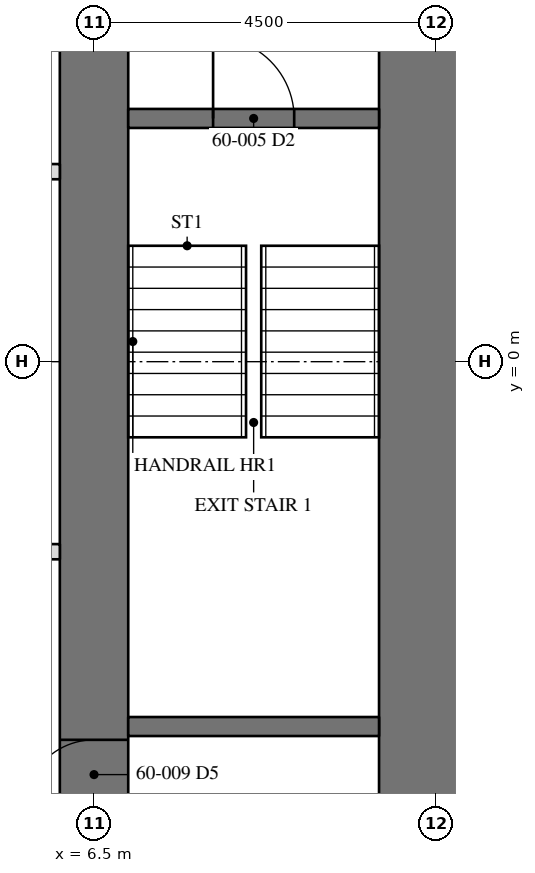
"""IFC4 building model, lengths in metres.
Left out: names, types, materials, properties, quantities, classifications, styles, units other than length and angle.
Written with IfcOpenShell. Run it as: python <this file> out.ifc"""

import sys

from ifc_helpers import new_model, si_unit, direction, frame, frame_2d, origin, place, context, subcontext, project, spatial, rectangle, extrude, element, fill, save


model = new_model("IFC4")
c1 = context("Model", 3, precision=1e-05, world=origin(), true_north=direction((0.0, 1.0)))
c2 = subcontext(c1, "Body", "Model", "MODEL_VIEW")
j1 = project(units=[si_unit("LENGTHUNIT", "METRE"), si_unit("PLANEANGLEUNIT", "RADIAN")], contexts=[c1])
p1 = place(None, origin())
s1 = spatial("IfcSite", under=j1, at=p1, CompositionType="ELEMENT")
p2 = place(p1, origin())
s2 = spatial("IfcBuilding", under=s1, at=p2, CompositionType="ELEMENT")
p3 = place(p2, frame((0.0, 0.0, 246.7)))
s3 = spatial("IfcBuildingStorey", under=s2, at=p3, CompositionType="ELEMENT", Elevation=246.7)
p4 = place(p3, frame((11.0, -11.0, 0.0), z_axis=(0.0, 0.0, 1.0), x_axis=(0.0, 1.0, 0.0)))
e1 = element("IfcWall", 1, at=p4, inside=s3, PredefinedType="SHEAR", context=c2, shape_type="SweptSolid", body=[
    extrude(rectangle(XDim=22.0, YDim=1.5, at=frame_2d((11.0, 0.0))), origin(), (0.0, 0.0, 1.0), 3.5),
])
p5 = place(p4, frame((15.393, 0.0, 0.0)))
e2 = element("IfcOpeningElement", 2, at=p5, cuts=e1, PredefinedType="OPENING", context=c2, shape_type="SweptSolid", body=[
    extrude(rectangle(XDim=0.915, YDim=2.134, at=frame_2d((0.458, 1.067))), frame((0.0, 0.76, 0.0), z_axis=(0.0, -1.0, 0.0), x_axis=(1.0, 0.0, 0.0)), (0.0, 0.0, 1.0), 1.52),
])
p6 = place(p3, frame((6.5, -6.5, 0.0), z_axis=(0.0, 0.0, 1.0), x_axis=(0.0, 1.0, 0.0)))
e3 = element("IfcWall", 3, at=p6, inside=s3, PredefinedType="SHEAR", context=c2, shape_type="SweptSolid", body=[
    extrude(rectangle(XDim=13.0, YDim=0.9, at=frame_2d((6.5, 0.0))), origin(), (0.0, 0.0, 1.0), 3.5),
])
p7 = place(p6, frame((10.893, 0.0, 0.0)))
e4 = element("IfcOpeningElement", 4, at=p7, cuts=e3, PredefinedType="OPENING", context=c2, shape_type="SweptSolid", body=[
    extrude(rectangle(XDim=0.915, YDim=2.134, at=frame_2d((0.458, 1.067))), frame((0.0, 0.46, 0.0), z_axis=(0.0, -1.0, 0.0), x_axis=(1.0, 0.0, 0.0)), (0.0, 0.0, 1.0), 0.92),
])
p8 = place(p6, frame((0.61, 0.0, 0.0)))
e5 = element("IfcOpeningElement", 5, at=p8, cuts=e3, PredefinedType="OPENING", context=c2, shape_type="SweptSolid", body=[
    extrude(rectangle(XDim=0.915, YDim=2.134, at=frame_2d((0.458, 1.067))), frame((0.0, 0.46, 0.0), z_axis=(0.0, -1.0, 0.0), x_axis=(1.0, 0.0, 0.0)), (0.0, 0.0, 1.0), 0.92),
])
p9 = place(p3, frame((6.95, -4.8, 0.0), z_axis=(0.0, 0.0, 1.0), x_axis=(1.0, 0.0, 0.0)))
e6 = element("IfcWall", 6, at=p9, inside=s3, PredefinedType="SOLIDWALL", context=c2, shape_type="SweptSolid", body=[
    extrude(rectangle(XDim=3.3, YDim=0.25, at=frame_2d((1.65, 0.0))), origin(), (0.0, 0.0, 1.0), 3.31),
])
p10 = place(p3, frame((6.95, 3.2, 0.0), z_axis=(0.0, 0.0, 1.0), x_axis=(1.0, 0.0, 0.0)))
e7 = element("IfcWall", 7, at=p10, inside=s3, PredefinedType="SOLIDWALL", context=c2, shape_type="SweptSolid", body=[
    extrude(rectangle(XDim=3.3, YDim=0.25, at=frame_2d((1.65, 0.0))), origin(), (0.0, 0.0, 1.0), 3.31),
])
p11 = place(p10, frame((1.116, 0.0, 0.0)))
e8 = element("IfcOpeningElement", 8, at=p11, cuts=e7, PredefinedType="OPENING", context=c2, shape_type="SweptSolid", body=[
    extrude(rectangle(XDim=1.067, YDim=2.134, at=frame_2d((0.533, 1.067))), frame((0.0, 0.135, 0.0), z_axis=(0.0, -1.0, 0.0), x_axis=(1.0, 0.0, 0.0)), (0.0, 0.0, 1.0), 0.27),
])
for number, where, z_axis, x_axis in (
    (9, (-6.05, 2.5, 0.0), (0.0, 0.0, 1.0), (1.0, 0.0, 0.0)),
    (10, (6.05, -2.5, 0.0), (0.0, 0.0, 1.0), (-1.0, 0.0, 0.0)),
):
    element("IfcWall", number, at=place(p3, frame(where, z_axis=z_axis, x_axis=x_axis)), inside=s3, PredefinedType="PARTITIONING", context=c2, shape_type="SweptSolid", body=[
        extrude(rectangle(XDim=12.1, YDim=0.2, at=frame_2d((6.05, 0.0))), origin(), (0.0, 0.0, 1.0), 3.31),
    ])
p12 = place(p11, origin())
e11 = element("IfcDoor", 11, at=p12, inside=s3, OperationType="SINGLE_SWING_LEFT", PredefinedType="DOOR", context=c2, shape_type="SweptSolid", body=[
    extrude(rectangle(XDim=1.067, YDim=2.134, at=frame_2d((0.533, 1.067))), frame((0.0, 0.025, 0.0), z_axis=(0.0, -1.0, 0.0), x_axis=(1.0, 0.0, 0.0)), (0.0, 0.0, 1.0), 0.05),
])
fill(e8, e11)
p13 = place(p8, origin())
e12 = element("IfcDoor", 12, at=p13, inside=s3, OperationType="SINGLE_SWING_RIGHT", PredefinedType="DOOR", context=c2, shape_type="SweptSolid", body=[
    extrude(rectangle(XDim=0.915, YDim=2.134, at=frame_2d((0.458, 1.067))), frame((0.0, -0.375, 0.0), z_axis=(0.0, -1.0, 0.0), x_axis=(1.0, 0.0, 0.0)), (0.0, 0.0, 1.0), 0.05),
])
fill(e5, e12)
save(model, sys.argv[1])
